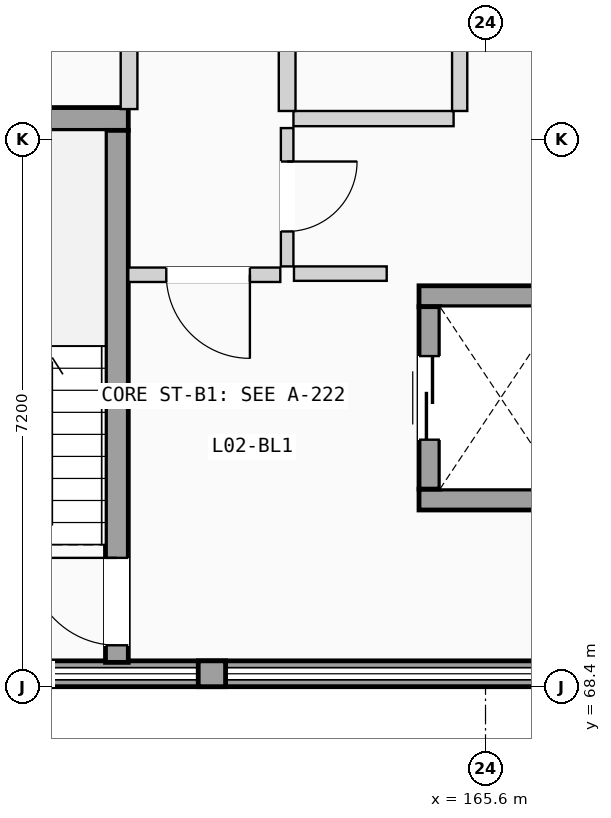
"""IFC4 building model, lengths in metres.
Left out: names, types, materials, properties, quantities, classifications, styles, units other than length and angle.
Written with IfcOpenShell. Run it as: python <this file> out.ifc"""

import sys

from ifc_helpers import new_model, si_unit, direction, frame, frame_2d, origin, place, context, subcontext, project, spatial, rectangle, extrude, element, fill, save


model = new_model("IFC4")
c1 = context("Model", 3, precision=1e-05, world=origin(), true_north=direction((0.0, 1.0)))
c2 = subcontext(c1, "Body", "Model", "MODEL_VIEW")
j1 = project(units=[si_unit("LENGTHUNIT", "METRE"), si_unit("PLANEANGLEUNIT", "RADIAN")], contexts=[c1])
p1 = place(None, origin())
s1 = spatial("IfcSite", under=j1, at=p1, CompositionType="ELEMENT")
p2 = place(p1, origin())
s2 = spatial("IfcBuilding", under=s1, at=p2, CompositionType="ELEMENT")
p3 = place(p2, frame((0.0, 0.0, 8.575)))
s3 = spatial("IfcBuildingStorey", under=s2, at=p3, CompositionType="ELEMENT", Elevation=8.575)
p4 = place(p3, frame((151.2, 68.57, 0.0), z_axis=(0.0, 0.0, 1.0), x_axis=(1.0, 0.0, 0.0)))
e1 = element("IfcWall", 1, at=p4, inside=s3, PredefinedType="SOLIDWALL", context=c2, shape_type="SweptSolid", body=[
    extrude(rectangle(XDim=21.6, YDim=0.34, at=frame_2d((10.8, 0.0))), origin(), (0.0, 0.0, 1.0), 1.11),
])
p5 = place(p3, frame((161.82, 68.57, 1.11), z_axis=(0.0, 0.0, 1.0), x_axis=(1.0, 0.0, 0.0)))
e2 = element("IfcWall", 2, at=p5, inside=s3, PredefinedType="SOLIDWALL", context=c2, shape_type="SweptSolid", body=[
    extrude(rectangle(XDim=0.36, YDim=0.34, at=frame_2d((0.18, 0.0))), origin(), (0.0, 0.0, 1.0), 2.13),
])
p6 = place(p3, frame((156.95, 75.87, 0.0), z_axis=(0.0, 0.0, 1.0), x_axis=(1.0, 0.0, 0.0)))
e3 = element("IfcWall", 3, at=p6, inside=s3, PredefinedType="SHEAR", context=c2, shape_type="SweptSolid", body=[
    extrude(rectangle(XDim=3.95, YDim=0.3, at=frame_2d((1.975, 0.0))), origin(), (0.0, 0.0, 1.0), 3.24),
])
p7 = place(p3, frame((160.75, 68.72, 0.0), z_axis=(0.0, 0.0, 1.0), x_axis=(0.0, 1.0, 0.0)))
e4 = element("IfcWall", 4, at=p7, inside=s3, PredefinedType="SHEAR", context=c2, shape_type="SweptSolid", body=[
    extrude(rectangle(XDim=7.0, YDim=0.3, at=frame_2d((3.5, 0.0))), origin(), (0.0, 0.0, 1.0), 3.24),
])
p8 = place(p7, frame((0.225, 0.0, 0.0)))
e5 = element("IfcOpeningElement", 5, at=p8, cuts=e4, PredefinedType="OPENING", context=c2, shape_type="SweptSolid", body=[
    extrude(rectangle(XDim=1.15, YDim=2.12, at=frame_2d((0.575, 1.06))), frame((0.0, 0.16, 0.0), z_axis=(0.0, -1.0, 0.0), x_axis=(1.0, 0.0, 0.0)), (0.0, 0.0, 1.0), 0.32),
])
for number, where, z_axis, x_axis in (
    (6, (164.725, 70.863, 0.0), (0.0, 0.0, 1.0), (1.0, 0.0, 0.0)),
    (7, (164.725, 73.538, 0.0), (0.0, 0.0, 1.0), (1.0, 0.0, 0.0)),
):
    element("IfcWall", number, at=place(p3, frame(where, z_axis=z_axis, x_axis=x_axis)), inside=s3, PredefinedType="SHEAR", context=c2, shape_type="SweptSolid", body=[
        extrude(rectangle(XDim=2.15, YDim=0.275, at=frame_2d((1.075, 0.0))), origin(), (0.0, 0.0, 1.0), 3.24),
    ])
p9 = place(p3, frame((164.863, 71.0, 0.0), z_axis=(0.0, 0.0, 1.0), x_axis=(0.0, 1.0, 0.0)))
e8 = element("IfcWall", 8, at=p9, inside=s3, PredefinedType="SHEAR", context=c2, shape_type="SweptSolid", body=[
    extrude(rectangle(XDim=2.4, YDim=0.275, at=frame_2d((1.2, 0.0))), origin(), (0.0, 0.0, 1.0), 3.24),
])
p10 = place(p9, frame((0.65, 0.0, 0.0)))
e9 = element("IfcOpeningElement", 9, at=p10, cuts=e8, PredefinedType="OPENING", context=c2, shape_type="SweptSolid", body=[
    extrude(rectangle(XDim=1.1, YDim=2.15, at=frame_2d((0.55, 1.075))), frame((0.0, 0.147, 0.0), z_axis=(0.0, -1.0, 0.0), x_axis=(1.0, 0.0, 0.0)), (0.0, 0.0, 1.0), 0.295),
])
p11 = place(p3, frame((163.08, 73.835, 0.0), z_axis=(0.0, 0.0, 1.0), x_axis=(1.0, 0.0, 0.0)))
e10 = element("IfcWall", 10, at=p11, inside=s3, PredefinedType="PARTITIONING", context=c2, shape_type="SweptSolid", body=[
    extrude(rectangle(XDim=1.22, YDim=0.19, at=frame_2d((0.61, 0.0))), origin(), (0.0, 0.0, 1.0), 3.22),
])
p12 = place(p3, frame((160.9, 73.82, 0.0), z_axis=(0.0, 0.0, 1.0), x_axis=(1.0, 0.0, 0.0)))
e11 = element("IfcWall", 11, at=p12, inside=s3, PredefinedType="PARTITIONING", context=c2, shape_type="SweptSolid", body=[
    extrude(rectangle(XDim=2.0, YDim=0.19, at=frame_2d((1.0, 0.0))), origin(), (0.0, 0.0, 1.0), 3.22),
])
p13 = place(p12, frame((0.5, 0.0, 0.0)))
e12 = element("IfcOpeningElement", 12, at=p13, cuts=e11, PredefinedType="OPENING", context=c2, shape_type="SweptSolid", body=[
    extrude(rectangle(XDim=1.1, YDim=2.12, at=frame_2d((0.55, 1.06))), frame((0.0, 0.105, 0.0), z_axis=(0.0, -1.0, 0.0), x_axis=(1.0, 0.0, 0.0)), (0.0, 0.0, 1.0), 0.21),
])
p14 = place(p3, frame((162.99, 73.93, 0.0), z_axis=(0.0, 0.0, 1.0), x_axis=(0.0, 1.0, 0.0)))
e13 = element("IfcWall", 13, at=p14, inside=s3, PredefinedType="PARTITIONING", context=c2, shape_type="SweptSolid", body=[
    extrude(rectangle(XDim=1.82, YDim=0.165, at=frame_2d((0.91, 0.0))), origin(), (0.0, 0.0, 1.0), 3.22),
])
p15 = place(p14, frame((0.46, 0.0, 0.0)))
e14 = element("IfcOpeningElement", 14, at=p15, cuts=e13, PredefinedType="OPENING", context=c2, shape_type="SweptSolid", body=[
    extrude(rectangle(XDim=0.92, YDim=2.04, at=frame_2d((0.46, 1.02))), frame((0.0, 0.093, 0.0), z_axis=(0.0, -1.0, 0.0), x_axis=(1.0, 0.0, 0.0)), (0.0, 0.0, 1.0), 0.185),
])
p16 = place(p3, frame((163.073, 75.875, 0.0), z_axis=(0.0, 0.0, 1.0), x_axis=(1.0, 0.0, 0.0)))
e15 = element("IfcWall", 15, at=p16, inside=s3, PredefinedType="PLUMBINGWALL", context=c2, shape_type="SweptSolid", body=[
    extrude(rectangle(XDim=2.107, YDim=0.2, at=frame_2d((1.053, 0.0))), origin(), (0.0, 0.0, 1.0), 3.22),
])
p17 = place(p3, frame((160.91, 76.0, 0.0), z_axis=(0.0, 0.0, 1.0), x_axis=(0.0, 1.0, 0.0)))
e16 = element("IfcWall", 16, at=p17, inside=s3, PredefinedType="PLUMBINGWALL", context=c2, shape_type="SweptSolid", body=[
    extrude(rectangle(XDim=5.785, YDim=0.22, at=frame_2d((2.893, 0.0))), origin(), (0.0, 0.0, 1.0), 3.22),
])
p18 = place(p3, frame((162.99, 75.975, 0.0), z_axis=(0.0, 0.0, 1.0), x_axis=(0.0, 1.0, 0.0)))
e17 = element("IfcWall", 17, at=p18, inside=s3, PredefinedType="PLUMBINGWALL", context=c2, shape_type="SweptSolid", body=[
    extrude(rectangle(XDim=5.81, YDim=0.22, at=frame_2d((2.905, 0.0))), origin(), (0.0, 0.0, 1.0), 3.22),
])
p19 = place(p3, frame((165.26, 75.975, 0.0), z_axis=(0.0, 0.0, 1.0), x_axis=(0.0, 1.0, 0.0)))
e18 = element("IfcWall", 18, at=p19, inside=s3, PredefinedType="PLUMBINGWALL", context=c2, shape_type="SweptSolid", body=[
    extrude(rectangle(XDim=5.83, YDim=0.2, at=frame_2d((2.915, 0.0))), origin(), (0.0, 0.0, 1.0), 3.22),
])
p20 = place(p19, frame((2.493, 0.0, 0.0)))
e19 = element("IfcOpeningElement", 19, at=p20, cuts=e18, PredefinedType="OPENING", context=c2, shape_type="SweptSolid", body=[
    extrude(rectangle(XDim=0.85, YDim=2.01, at=frame_2d((0.425, 1.005))), frame((0.0, 0.11, 0.0), z_axis=(0.0, -1.0, 0.0), x_axis=(1.0, 0.0, 0.0)), (0.0, 0.0, 1.0), 0.22),
])
p21 = place(p8, origin())
e20 = element("IfcDoor", 20, at=p21, inside=s3, OperationType="SINGLE_SWING_RIGHT", PredefinedType="DOOR", context=c2, shape_type="SweptSolid", body=[
    extrude(rectangle(XDim=1.15, YDim=2.12, at=frame_2d((0.575, 1.06))), frame((0.0, 0.025, 0.0), z_axis=(0.0, -1.0, 0.0), x_axis=(1.0, 0.0, 0.0)), (0.0, 0.0, 1.0), 0.05),
])
fill(e5, e20)
p22 = place(p10, origin())
e21 = element("IfcDoor", 21, at=p22, inside=s3, OperationType="SLIDING_TO_LEFT", PredefinedType="DOOR", context=c2, shape_type="SweptSolid", body=[
    extrude(rectangle(XDim=1.1, YDim=2.15, at=frame_2d((0.55, 1.075))), frame((0.0, 0.025, 0.0), z_axis=(0.0, -1.0, 0.0), x_axis=(1.0, 0.0, 0.0)), (0.0, 0.0, 1.0), 0.05),
])
fill(e9, e21)
p23 = place(p13, frame((1.1, 0.0, 0.0), z_axis=(0.0, 0.0, 1.0), x_axis=(-1.0, 0.0, 0.0)))
e22 = element("IfcDoor", 22, at=p23, inside=s3, OperationType="SINGLE_SWING_RIGHT", PredefinedType="DOOR", context=c2, shape_type="SweptSolid", body=[
    extrude(rectangle(XDim=1.1, YDim=2.12, at=frame_2d((0.55, 1.06))), frame((0.0, 0.025, 0.0), z_axis=(0.0, -1.0, 0.0), x_axis=(1.0, 0.0, 0.0)), (0.0, 0.0, 1.0), 0.05),
])
fill(e12, e22)
p24 = place(p15, frame((0.92, 0.0, 0.0), z_axis=(0.0, 0.0, 1.0), x_axis=(-1.0, 0.0, 0.0)))
e23 = element("IfcDoor", 23, at=p24, inside=s3, OperationType="SINGLE_SWING_RIGHT", PredefinedType="DOOR", context=c2, shape_type="SweptSolid", body=[
    extrude(rectangle(XDim=0.92, YDim=2.04, at=frame_2d((0.46, 1.02))), frame((0.0, 0.025, 0.0), z_axis=(0.0, -1.0, 0.0), x_axis=(1.0, 0.0, 0.0)), (0.0, 0.0, 1.0), 0.05),
])
fill(e14, e23)
save(model, sys.argv[1])
